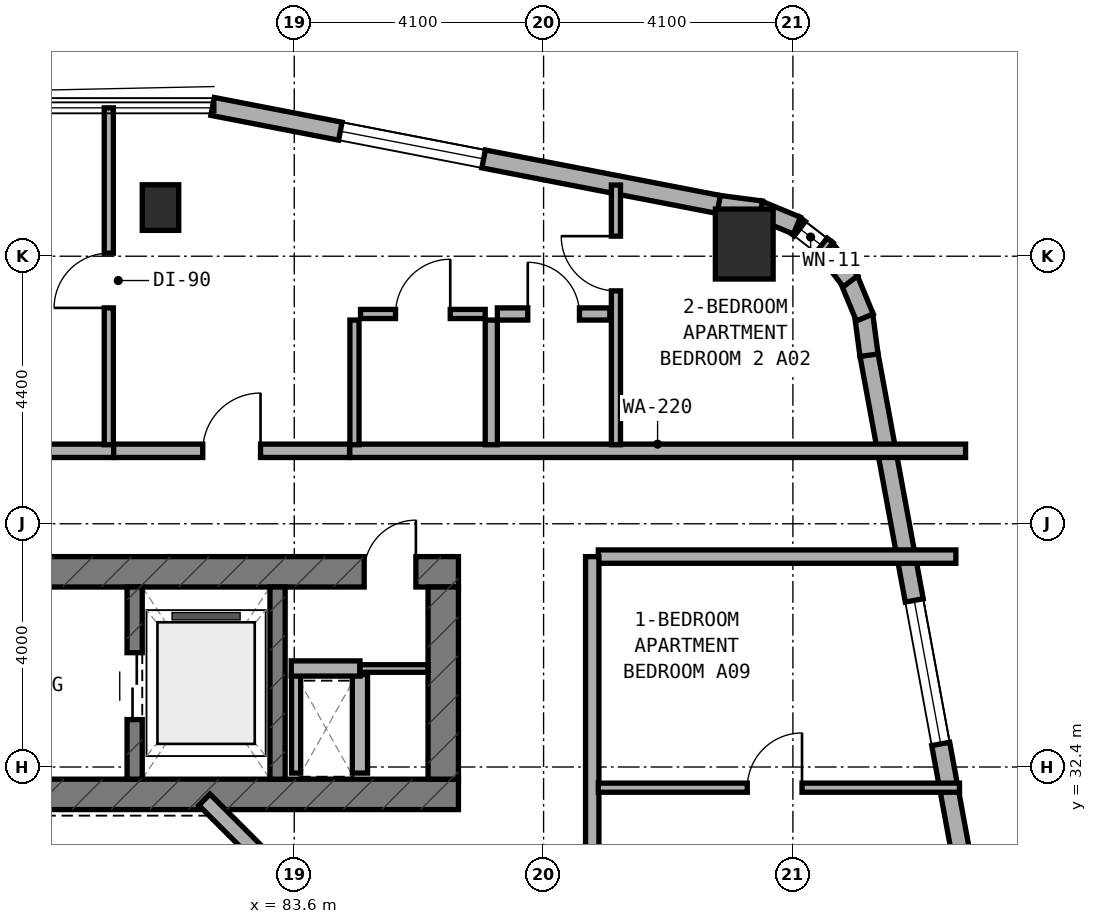
"""IFC4 building model, lengths in metres.
Left out: names, types, materials, properties, quantities, classifications, styles, units other than length and angle.
Written with IfcOpenShell. Run it as: python <this file> out.ifc"""

import sys

from ifc_helpers import new_model, si_unit, direction, frame, frame_2d, origin, origin_2d, place, context, subcontext, project, spatial, rectangle, extrude, element, fill, save


model = new_model("IFC4")
c1 = context("Model", 3, precision=1e-05, world=origin(), true_north=direction((0.0, 1.0)))
c2 = subcontext(c1, "Body", "Model", "MODEL_VIEW")
j1 = project(units=[si_unit("LENGTHUNIT", "METRE"), si_unit("PLANEANGLEUNIT", "RADIAN")], contexts=[c1])
p1 = place(None, origin())
s1 = spatial("IfcSite", under=j1, at=p1, CompositionType="ELEMENT")
p2 = place(p1, origin())
s2 = spatial("IfcBuilding", under=s1, at=p2, CompositionType="ELEMENT")
p3 = place(p2, frame((0.0, 0.0, 80.0)))
s3 = spatial("IfcBuildingStorey", under=s2, at=p3, CompositionType="ELEMENT", Elevation=80.0)
p4 = place(p3, frame((67.9, 31.95, 0.0), z_axis=(0.0, 0.0, 1.0), x_axis=(1.0, 0.0, 0.0)))
e1 = element("IfcWall", 1, at=p4, inside=s3, PredefinedType="SHEAR", context=c2, shape_type="SweptSolid", body=[
    extrude(rectangle(XDim=18.4, YDim=0.5, at=frame_2d((9.2, 0.0))), origin(), (0.0, 0.0, 1.0), 3.5),
])
p5 = place(p3, frame((67.9, 35.61, 0.0), z_axis=(0.0, 0.0, 1.0), x_axis=(1.0, 0.0, 0.0)))
e2 = element("IfcWall", 2, at=p5, inside=s3, PredefinedType="SHEAR", context=c2, shape_type="SweptSolid", body=[
    extrude(rectangle(XDim=18.4, YDim=0.5, at=frame_2d((9.2, 0.0))), origin(), (0.0, 0.0, 1.0), 3.5),
])
p6 = place(p5, frame((9.25, 0.0, 0.0)))
e3 = element("IfcOpeningElement", 3, at=p6, cuts=e2, PredefinedType="OPENING", context=c2, shape_type="SweptSolid", body=[
    extrude(rectangle(XDim=1.2, YDim=2.15, at=frame_2d((0.6, 1.075))), frame((0.0, 0.26, 0.0), z_axis=(0.0, -1.0, 0.0), x_axis=(1.0, 0.0, 0.0)), (0.0, 0.0, 1.0), 0.52),
])
p7 = place(p5, frame((16.85, 0.0, 0.0)))
e4 = element("IfcOpeningElement", 4, at=p7, cuts=e2, PredefinedType="OPENING", context=c2, shape_type="SweptSolid", body=[
    extrude(rectangle(XDim=0.85, YDim=2.1, at=frame_2d((0.425, 1.05))), frame((0.0, 0.26, 0.0), z_axis=(0.0, -1.0, 0.0), x_axis=(1.0, 0.0, 0.0)), (0.0, 0.0, 1.0), 0.52),
])
p8 = place(p3, frame((86.05, 32.2, 0.0), z_axis=(0.0, 0.0, 1.0), x_axis=(0.0, 1.0, 0.0)))
e5 = element("IfcWall", 5, at=p8, inside=s3, PredefinedType="SHEAR", context=c2, shape_type="SweptSolid", body=[
    extrude(rectangle(XDim=3.16, YDim=0.5, at=frame_2d((1.58, 0.0))), origin(), (0.0, 0.0, 1.0), 3.5),
])
p9 = place(p3, frame((80.975, 32.2, 0.0), z_axis=(0.0, 0.0, 1.0), x_axis=(0.0, 1.0, 0.0)))
e6 = element("IfcWall", 6, at=p9, inside=s3, PredefinedType="STANDARD", context=c2, shape_type="SweptSolid", body=[
    extrude(rectangle(XDim=3.16, YDim=0.25, at=frame_2d((1.58, 0.0))), origin(), (0.0, 0.0, 1.0), 3.25),
])
p10 = place(p9, frame((0.98, 0.0, 0.0)))
e7 = element("IfcOpeningElement", 7, at=p10, cuts=e6, PredefinedType="OPENING", context=c2, shape_type="SweptSolid", body=[
    extrude(rectangle(XDim=1.1, YDim=2.15, at=frame_2d((0.55, 1.075))), frame((0.0, 0.135, 0.0), z_axis=(0.0, -1.0, 0.0), x_axis=(1.0, 0.0, 0.0)), (0.0, 0.0, 1.0), 0.27),
])
p11 = place(p3, frame((83.325, 32.2, 0.0), z_axis=(0.0, 0.0, 1.0), x_axis=(0.0, 1.0, 0.0)))
e8 = element("IfcWall", 8, at=p11, inside=s3, PredefinedType="STANDARD", context=c2, shape_type="SweptSolid", body=[
    extrude(rectangle(XDim=3.16, YDim=0.25, at=frame_2d((1.58, 0.0))), origin(), (0.0, 0.0, 1.0), 3.25),
])
p12 = place(p3, frame((81.4, 41.6, 0.0), z_axis=(0.0, 0.0, 1.0), x_axis=(1.0, 0.0, 0.0)))
e9 = element("IfcColumn", 9, at=p12, inside=s3, PredefinedType="COLUMN", context=c2, shape_type="SweptSolid", body=[
    extrude(rectangle(XDim=0.6, YDim=0.75, at=origin_2d()), origin(), (0.0, 0.0, 1.0), 3.5),
])
p13 = place(p3, frame((91.0, 41.0, 0.0), z_axis=(0.0, 0.0, 1.0), x_axis=(1.0, 0.0, 0.0)))
e10 = element("IfcColumn", 10, at=p13, inside=s3, PredefinedType="COLUMN", context=c2, shape_type="SweptSolid", body=[
    extrude(rectangle(XDim=0.95, YDim=1.15, at=origin_2d()), origin(), (0.0, 0.0, 1.0), 3.5),
])
p14 = place(p3, frame((94.662, 30.439, 0.0), z_axis=(0.0, 0.0, 1.0), x_axis=(-0.181241420611, 0.983438634311, 0.0)))
e11 = element("IfcWall", 11, at=p14, inside=s3, PredefinedType="STANDARD", context=c2, shape_type="SweptSolid", body=[
    extrude(rectangle(XDim=8.889, YDim=0.3, at=frame_2d((4.445, 0.0))), origin(), (0.0, 0.0, 1.0), 3.25),
])
p15 = place(p14, frame((2.38, 0.0, 0.8)))
e12 = element("IfcOpeningElement", 12, at=p15, cuts=e11, PredefinedType="OPENING", context=c2, shape_type="SweptSolid", body=[
    extrude(rectangle(XDim=2.4, YDim=1.6, at=frame_2d((1.2, 0.8))), frame((0.0, 0.16, 0.0), z_axis=(0.0, -1.0, 0.0), x_axis=(1.0, 0.0, 0.0)), (0.0, 0.0, 1.0), 0.32),
])
p16 = place(p3, frame((93.052, 39.172, 0.0), z_axis=(0.0, 0.0, 1.0), x_axis=(-0.131667498923, 0.991293937098, 0.0)))
e13 = element("IfcWall", 13, at=p16, inside=s3, PredefinedType="STANDARD", context=c2, shape_type="SweptSolid", body=[
    extrude(rectangle(XDim=0.677, YDim=0.3, at=frame_2d((0.338, 0.0))), origin(), (0.0, 0.0, 1.0), 3.25),
])
p17 = place(p3, frame((92.982, 39.793, 0.0), z_axis=(0.0, 0.0, 1.0), x_axis=(-0.381864727877, 0.92421822618, 0.0)))
e14 = element("IfcWall", 14, at=p17, inside=s3, PredefinedType="STANDARD", context=c2, shape_type="SweptSolid", body=[
    extrude(rectangle(XDim=0.694, YDim=0.3, at=frame_2d((0.347, 0.0))), origin(), (0.0, 0.0, 1.0), 3.25),
])
p18 = place(p3, frame((92.748, 40.389, 0.0), z_axis=(0.0, 0.0, 1.0), x_axis=(-0.609693758543, 0.792637067512, 0.0)))
e15 = element("IfcWall", 15, at=p18, inside=s3, PredefinedType="STANDARD", context=c2, shape_type="SweptSolid", body=[
    extrude(rectangle(XDim=0.694, YDim=0.3, at=frame_2d((0.347, 0.0))), origin(), (0.0, 0.0, 1.0), 3.25),
])
p19 = place(p3, frame((92.367, 40.904, 0.0), z_axis=(0.0, 0.0, 1.0), x_axis=(-0.792807092876, 0.609472651958, 0.0)))
e16 = element("IfcWall", 16, at=p19, inside=s3, PredefinedType="STANDARD", context=c2, shape_type="SweptSolid", body=[
    extrude(rectangle(XDim=0.694, YDim=0.3, at=frame_2d((0.347, 0.0))), origin(), (0.0, 0.0, 1.0), 3.25),
])
p20 = place(p19, frame((0.122, 0.0, 0.85)))
e17 = element("IfcOpeningElement", 17, at=p20, cuts=e16, PredefinedType="OPENING", context=c2, shape_type="SweptSolid", body=[
    extrude(rectangle(XDim=0.45, YDim=1.5, at=frame_2d((0.225, 0.75))), frame((0.0, 0.16, 0.0), z_axis=(0.0, -1.0, 0.0), x_axis=(1.0, 0.0, 0.0)), (0.0, 0.0, 1.0), 0.32),
])
p21 = place(p3, frame((91.866, 41.303, 0.0), z_axis=(0.0, 0.0, 1.0), x_axis=(-0.924042561464, 0.382289608286, 0.0)))
e18 = element("IfcWall", 18, at=p21, inside=s3, PredefinedType="STANDARD", context=c2, shape_type="SweptSolid", body=[
    extrude(rectangle(XDim=0.694, YDim=0.3, at=frame_2d((0.347, 0.0))), origin(), (0.0, 0.0, 1.0), 3.25),
])
p22 = place(p3, frame((91.278, 41.559, 0.0), z_axis=(0.0, 0.0, 1.0), x_axis=(-0.991433279471, 0.130614135366, 0.0)))
e19 = element("IfcWall", 19, at=p22, inside=s3, PredefinedType="STANDARD", context=c2, shape_type="SweptSolid", body=[
    extrude(rectangle(XDim=0.712, YDim=0.3, at=frame_2d((0.356, 0.0))), origin(), (0.0, 0.0, 1.0), 3.25),
])
p23 = place(p3, frame((90.579, 41.651, 0.0), z_axis=(0.0, 0.0, 1.0), x_axis=(-0.981750199588, 0.190175039396, 0.0)))
e20 = element("IfcWall", 20, at=p23, inside=s3, PredefinedType="STANDARD", context=c2, shape_type="SweptSolid", body=[
    extrude(rectangle(XDim=8.477, YDim=0.3, at=frame_2d((4.238, 0.0))), origin(), (0.0, 0.0, 1.0), 3.25),
])
p24 = place(p23, frame((3.937, 0.0, 0.8)))
e21 = element("IfcOpeningElement", 21, at=p24, cuts=e20, PredefinedType="OPENING", context=c2, shape_type="SweptSolid", body=[
    extrude(rectangle(XDim=2.4, YDim=1.6, at=frame_2d((1.2, 0.8))), frame((0.0, 0.16, 0.0), z_axis=(0.0, -1.0, 0.0), x_axis=(1.0, 0.0, 0.0)), (0.0, 0.0, 1.0), 0.32),
])
p25 = place(p3, frame((83.756, 30.228, 0.0), z_axis=(0.0, 0.0, 1.0), x_axis=(-0.707106781187, 0.707106781187, 0.0)))
e22 = element("IfcWall", 22, at=p25, inside=s3, PredefinedType="STANDARD", context=c2, shape_type="SweptSolid", body=[
    extrude(rectangle(XDim=2.311, YDim=0.26, at=frame_2d((1.155, 0.0))), origin(), (0.0, 0.0, 1.0), 3.25),
])
p26 = place(p3, frame((83.63, 32.3, 0.0), z_axis=(0.0, 0.0, 1.0), x_axis=(0.0, 1.0, 0.0)))
e23 = element("IfcWall", 23, at=p26, inside=s3, PredefinedType="PARTITIONING", context=c2, shape_type="SweptSolid", body=[
    extrude(rectangle(XDim=1.62, YDim=0.15, at=frame_2d((0.81, 0.0))), origin(), (0.0, 0.0, 1.0), 2.825),
])
p27 = place(p3, frame((84.68, 32.3, 0.0), z_axis=(0.0, 0.0, 1.0), x_axis=(0.0, 1.0, 0.0)))
e24 = element("IfcWall", 24, at=p27, inside=s3, PredefinedType="SOLIDWALL", context=c2, shape_type="SweptSolid", body=[
    extrude(rectangle(XDim=1.62, YDim=0.25, at=frame_2d((0.81, 0.0))), origin(), (0.0, 0.0, 1.0), 3.22),
])
p28 = place(p3, frame((83.55, 34.02, 0.0), z_axis=(0.0, 0.0, 1.0), x_axis=(1.0, 0.0, 0.0)))
e25 = element("IfcWall", 25, at=p28, inside=s3, PredefinedType="SOLIDWALL", context=c2, shape_type="SweptSolid", body=[
    extrude(rectangle(XDim=1.13, YDim=0.25, at=frame_2d((0.565, 0.0))), origin(), (0.0, 0.0, 1.0), 3.22),
])
p29 = place(p3, frame((84.68, 34.02, 0.0), z_axis=(0.0, 0.0, 1.0), x_axis=(1.0, 0.0, 0.0)))
e26 = element("IfcWall", 26, at=p29, inside=s3, PredefinedType="PARTITIONING", context=c2, shape_type="SweptSolid", body=[
    extrude(rectangle(XDim=1.12, YDim=0.125, at=frame_2d((0.56, 0.0))), origin(), (0.0, 0.0, 1.0), 3.22),
])
p30 = place(p3, frame((74.8, 37.6, 0.0), z_axis=(0.0, 0.0, 1.0), x_axis=(1.0, 0.0, 0.0)))
e27 = element("IfcWall", 27, at=p30, inside=s3, PredefinedType="SOLIDWALL", context=c2, shape_type="SweptSolid", body=[
    extrude(rectangle(XDim=5.83, YDim=0.22, at=frame_2d((2.915, 0.0))), origin(), (0.0, 0.0, 1.0), 3.22),
])
p31 = place(p3, frame((84.51, 37.6, 0.0), z_axis=(0.0, 0.0, 1.0), x_axis=(1.0, 0.0, 0.0)))
e28 = element("IfcWall", 28, at=p31, inside=s3, PredefinedType="SOLIDWALL", context=c2, shape_type="SweptSolid", body=[
    extrude(rectangle(XDim=10.13, YDim=0.22, at=frame_2d((5.065, 0.0))), origin(), (0.0, 0.0, 1.0), 2.945),
])
p32 = place(p3, frame((80.63, 37.6, 0.0), z_axis=(0.0, 0.0, 1.0), x_axis=(1.0, 0.0, 0.0)))
e29 = element("IfcWall", 29, at=p32, inside=s3, PredefinedType="SOLIDWALL", context=c2, shape_type="SweptSolid", body=[
    extrude(rectangle(XDim=3.88, YDim=0.22, at=frame_2d((1.94, 0.0))), origin(), (0.0, 0.0, 1.0), 2.825),
])
p33 = place(p32, frame((1.465, 0.0, 0.0)))
e30 = element("IfcOpeningElement", 30, at=p33, cuts=e29, PredefinedType="OPENING", context=c2, shape_type="SweptSolid", body=[
    extrude(rectangle(XDim=0.95, YDim=2.1, at=frame_2d((0.475, 1.05))), frame((0.0, 0.12, 0.0), z_axis=(0.0, -1.0, 0.0), x_axis=(1.0, 0.0, 0.0)), (0.0, 0.0, 1.0), 0.24),
])
p34 = place(p3, frame((80.55, 37.7, 0.0), z_axis=(0.0, 0.0, 1.0), x_axis=(0.0, 1.0, 0.0)))
e31 = element("IfcWall", 31, at=p34, inside=s3, PredefinedType="PARTITIONING", context=c2, shape_type="SweptSolid", body=[
    extrude(rectangle(XDim=5.54, YDim=0.15, at=frame_2d((2.77, 0.0))), origin(), (0.0, 0.0, 1.0), 2.825),
])
p35 = place(p34, frame((2.25, 0.0, 0.0)))
e32 = element("IfcOpeningElement", 32, at=p35, cuts=e31, PredefinedType="OPENING", context=c2, shape_type="SweptSolid", body=[
    extrude(rectangle(XDim=0.9, YDim=2.1, at=frame_2d((0.45, 1.05))), frame((0.0, 0.085, 0.0), z_axis=(0.0, -1.0, 0.0), x_axis=(1.0, 0.0, 0.0)), (0.0, 0.0, 1.0), 0.17),
])
p36 = place(p3, frame((88.89, 37.7, 0.0), z_axis=(0.0, 0.0, 1.0), x_axis=(0.0, 1.0, 0.0)))
e33 = element("IfcWall", 33, at=p36, inside=s3, PredefinedType="PARTITIONING", context=c2, shape_type="SweptSolid", body=[
    extrude(rectangle(XDim=4.27, YDim=0.15, at=frame_2d((2.135, 0.0))), origin(), (0.0, 0.0, 1.0), 2.945),
])
p37 = place(p36, frame((2.53, 0.0, 0.0)))
e34 = element("IfcOpeningElement", 34, at=p37, cuts=e33, PredefinedType="OPENING", context=c2, shape_type="SweptSolid", body=[
    extrude(rectangle(XDim=0.9, YDim=2.1, at=frame_2d((0.45, 1.05))), frame((0.0, 0.085, 0.0), z_axis=(0.0, -1.0, 0.0), x_axis=(1.0, 0.0, 0.0)), (0.0, 0.0, 1.0), 0.17),
])
p38 = place(p3, frame((86.84, 37.7, 0.0), z_axis=(0.0, 0.0, 1.0), x_axis=(0.0, 1.0, 0.0)))
e35 = element("IfcWall", 35, at=p38, inside=s3, PredefinedType="PLUMBINGWALL", context=c2, shape_type="SweptSolid", body=[
    extrude(rectangle(XDim=2.05, YDim=0.2, at=frame_2d((1.025, 0.0))), origin(), (0.0, 0.0, 1.0), 3.22),
])
p39 = place(p3, frame((84.59, 37.7, 0.0), z_axis=(0.0, 0.0, 1.0), x_axis=(0.0, 1.0, 0.0)))
e36 = element("IfcWall", 36, at=p39, inside=s3, PredefinedType="PARTITIONING", context=c2, shape_type="SweptSolid", body=[
    extrude(rectangle(XDim=2.05, YDim=0.15, at=frame_2d((1.025, 0.0))), origin(), (0.0, 0.0, 1.0), 3.22),
])
p40 = place(p3, frame((86.94, 39.85, 0.0), z_axis=(0.0, 0.0, 1.0), x_axis=(1.0, 0.0, 0.0)))
e37 = element("IfcWall", 37, at=p40, inside=s3, PredefinedType="PLUMBINGWALL", context=c2, shape_type="SweptSolid", body=[
    extrude(rectangle(XDim=1.85, YDim=0.2, at=frame_2d((0.925, 0.0))), origin(), (0.0, 0.0, 1.0), 3.22),
])
p41 = place(p40, frame((0.5, 0.0, 0.0)))
e38 = element("IfcOpeningElement", 38, at=p41, cuts=e37, PredefinedType="OPENING", context=c2, shape_type="SweptSolid", body=[
    extrude(rectangle(XDim=0.85, YDim=2.1, at=frame_2d((0.425, 1.05))), frame((0.0, 0.11, 0.0), z_axis=(0.0, -1.0, 0.0), x_axis=(1.0, 0.0, 0.0)), (0.0, 0.0, 1.0), 0.22),
])
p42 = place(p3, frame((84.69, 39.85, 0.0), z_axis=(0.0, 0.0, 1.0), x_axis=(1.0, 0.0, 0.0)))
e39 = element("IfcWall", 39, at=p42, inside=s3, PredefinedType="PARTITIONING", context=c2, shape_type="SweptSolid", body=[
    extrude(rectangle(XDim=2.05, YDim=0.15, at=frame_2d((1.025, 0.0))), origin(), (0.0, 0.0, 1.0), 3.22),
])
p43 = place(p42, frame((0.575, 0.0, 0.0)))
e40 = element("IfcOpeningElement", 40, at=p43, cuts=e39, PredefinedType="OPENING", context=c2, shape_type="SweptSolid", body=[
    extrude(rectangle(XDim=0.9, YDim=2.1, at=frame_2d((0.45, 1.05))), frame((0.0, 0.085, 0.0), z_axis=(0.0, -1.0, 0.0), x_axis=(1.0, 0.0, 0.0)), (0.0, 0.0, 1.0), 0.17),
])
p44 = place(p3, frame((88.6, 35.86, 0.0), z_axis=(0.0, 0.0, 1.0), x_axis=(1.0, 0.0, 0.0)))
e41 = element("IfcWall", 41, at=p44, inside=s3, PredefinedType="SOLIDWALL", context=c2, shape_type="SweptSolid", body=[
    extrude(rectangle(XDim=5.88, YDim=0.22, at=frame_2d((2.94, 0.0))), origin(), (0.0, 0.0, 1.0), 2.945),
])
p45 = place(p3, frame((88.5, 26.4, 0.0), z_axis=(0.0, 0.0, 1.0), x_axis=(0.0, 1.0, 0.0)))
e42 = element("IfcWall", 42, at=p45, inside=s3, PredefinedType="SOLIDWALL", context=c2, shape_type="SweptSolid", body=[
    extrude(rectangle(XDim=9.46, YDim=0.22, at=frame_2d((4.73, 0.0))), origin(), (0.0, 0.0, 1.0), 2.825),
])
p46 = place(p45, frame((2.355, 0.0, 0.0)))
e43 = element("IfcOpeningElement", 43, at=p46, cuts=e42, PredefinedType="OPENING", context=c2, shape_type="SweptSolid", body=[
    extrude(rectangle(XDim=0.95, YDim=2.1, at=frame_2d((0.475, 1.05))), frame((0.0, 0.12, 0.0), z_axis=(0.0, -1.0, 0.0), x_axis=(1.0, 0.0, 0.0)), (0.0, 0.0, 1.0), 0.24),
])
p47 = place(p3, frame((88.6, 32.06, 0.0), z_axis=(0.0, 0.0, 1.0), x_axis=(1.0, 0.0, 0.0)))
e44 = element("IfcWall", 44, at=p47, inside=s3, PredefinedType="PARTITIONING", context=c2, shape_type="SweptSolid", body=[
    extrude(rectangle(XDim=5.94, YDim=0.15, at=frame_2d((2.97, 0.0))), origin(), (0.0, 0.0, 1.0), 2.945),
])
p48 = place(p47, frame((2.45, 0.0, 0.0)))
e45 = element("IfcOpeningElement", 45, at=p48, cuts=e44, PredefinedType="OPENING", context=c2, shape_type="SweptSolid", body=[
    extrude(rectangle(XDim=0.9, YDim=2.1, at=frame_2d((0.45, 1.05))), frame((0.0, 0.085, 0.0), z_axis=(0.0, -1.0, 0.0), x_axis=(1.0, 0.0, 0.0)), (0.0, 0.0, 1.0), 0.17),
])
p49 = place(p15, origin())
e46 = element("IfcWindow", 46, at=p49, inside=s3, PartitioningType="SINGLE_PANEL", PredefinedType="WINDOW", context=c2, shape_type="SweptSolid", body=[
    extrude(rectangle(XDim=2.4, YDim=1.6, at=frame_2d((1.2, 0.8))), frame((0.0, 0.03, 0.0), z_axis=(0.0, -1.0, 0.0), x_axis=(1.0, 0.0, 0.0)), (0.0, 0.0, 1.0), 0.06),
])
fill(e12, e46)
p50 = place(p24, origin())
e47 = element("IfcWindow", 47, at=p50, inside=s3, PartitioningType="SINGLE_PANEL", PredefinedType="WINDOW", context=c2, shape_type="SweptSolid", body=[
    extrude(rectangle(XDim=2.4, YDim=1.6, at=frame_2d((1.2, 0.8))), frame((0.0, 0.03, 0.0), z_axis=(0.0, -1.0, 0.0), x_axis=(1.0, 0.0, 0.0)), (0.0, 0.0, 1.0), 0.06),
])
fill(e21, e47)
p51 = place(p20, origin())
e48 = element("IfcWindow", 48, at=p51, inside=s3, PartitioningType="SINGLE_PANEL", PredefinedType="WINDOW", context=c2, shape_type="SweptSolid", body=[
    extrude(rectangle(XDim=0.45, YDim=1.5, at=frame_2d((0.225, 0.75))), frame((0.0, 0.03, 0.0), z_axis=(0.0, -1.0, 0.0), x_axis=(1.0, 0.0, 0.0)), (0.0, 0.0, 1.0), 0.06),
])
fill(e17, e48)
p52 = place(p10, origin())
e49 = element("IfcDoor", 49, at=p52, inside=s3, OperationType="DOUBLE_DOOR_SLIDING", PredefinedType="DOOR", context=c2, shape_type="SweptSolid", body=[
    extrude(rectangle(XDim=1.1, YDim=2.15, at=frame_2d((0.55, 1.075))), frame((0.0, 0.025, 0.0), z_axis=(0.0, -1.0, 0.0), x_axis=(1.0, 0.0, 0.0)), (0.0, 0.0, 1.0), 0.05),
])
fill(e7, e49)
p53 = place(p7, origin())
e50 = element("IfcDoor", 50, at=p53, inside=s3, OperationType="SINGLE_SWING_RIGHT", PredefinedType="DOOR", context=c2, shape_type="SweptSolid", body=[
    extrude(rectangle(XDim=0.85, YDim=2.1, at=frame_2d((0.425, 1.05))), frame((0.0, 0.025, 0.0), z_axis=(0.0, -1.0, 0.0), x_axis=(1.0, 0.0, 0.0)), (0.0, 0.0, 1.0), 0.05),
])
fill(e4, e50)
p54 = place(p33, origin())
e51 = element("IfcDoor", 51, at=p54, inside=s3, OperationType="SINGLE_SWING_RIGHT", PredefinedType="DOOR", context=c2, shape_type="SweptSolid", body=[
    extrude(rectangle(XDim=0.95, YDim=2.1, at=frame_2d((0.475, 1.05))), frame((0.0, 0.025, 0.0), z_axis=(0.0, -1.0, 0.0), x_axis=(1.0, 0.0, 0.0)), (0.0, 0.0, 1.0), 0.05),
])
fill(e30, e51)
p55 = place(p35, origin())
e52 = element("IfcDoor", 52, at=p55, inside=s3, OperationType="SINGLE_SWING_LEFT", PredefinedType="DOOR", context=c2, shape_type="SweptSolid", body=[
    extrude(rectangle(XDim=0.9, YDim=2.1, at=frame_2d((0.45, 1.05))), frame((0.0, 0.025, 0.0), z_axis=(0.0, -1.0, 0.0), x_axis=(1.0, 0.0, 0.0)), (0.0, 0.0, 1.0), 0.05),
])
fill(e32, e52)
p56 = place(p37, origin())
e53 = element("IfcDoor", 53, at=p56, inside=s3, OperationType="SINGLE_SWING_RIGHT", PredefinedType="DOOR", context=c2, shape_type="SweptSolid", body=[
    extrude(rectangle(XDim=0.9, YDim=2.1, at=frame_2d((0.45, 1.05))), frame((0.0, 0.025, 0.0), z_axis=(0.0, -1.0, 0.0), x_axis=(1.0, 0.0, 0.0)), (0.0, 0.0, 1.0), 0.05),
])
fill(e34, e53)
p57 = place(p41, origin())
e54 = element("IfcDoor", 54, at=p57, inside=s3, OperationType="SINGLE_SWING_LEFT", PredefinedType="DOOR", context=c2, shape_type="SweptSolid", body=[
    extrude(rectangle(XDim=0.85, YDim=2.1, at=frame_2d((0.425, 1.05))), frame((0.0, 0.025, 0.0), z_axis=(0.0, -1.0, 0.0), x_axis=(1.0, 0.0, 0.0)), (0.0, 0.0, 1.0), 0.05),
])
fill(e38, e54)
p58 = place(p43, origin())
e55 = element("IfcDoor", 55, at=p58, inside=s3, OperationType="SINGLE_SWING_RIGHT", PredefinedType="DOOR", context=c2, shape_type="SweptSolid", body=[
    extrude(rectangle(XDim=0.9, YDim=2.1, at=frame_2d((0.45, 1.05))), frame((0.0, 0.025, 0.0), z_axis=(0.0, -1.0, 0.0), x_axis=(1.0, 0.0, 0.0)), (0.0, 0.0, 1.0), 0.05),
])
fill(e40, e55)
p59 = place(p48, origin())
e56 = element("IfcDoor", 56, at=p59, inside=s3, OperationType="SINGLE_SWING_RIGHT", PredefinedType="DOOR", context=c2, shape_type="SweptSolid", body=[
    extrude(rectangle(XDim=0.9, YDim=2.1, at=frame_2d((0.45, 1.05))), frame((0.0, 0.025, 0.0), z_axis=(0.0, -1.0, 0.0), x_axis=(1.0, 0.0, 0.0)), (0.0, 0.0, 1.0), 0.05),
])
fill(e45, e56)
save(model, sys.argv[1])
